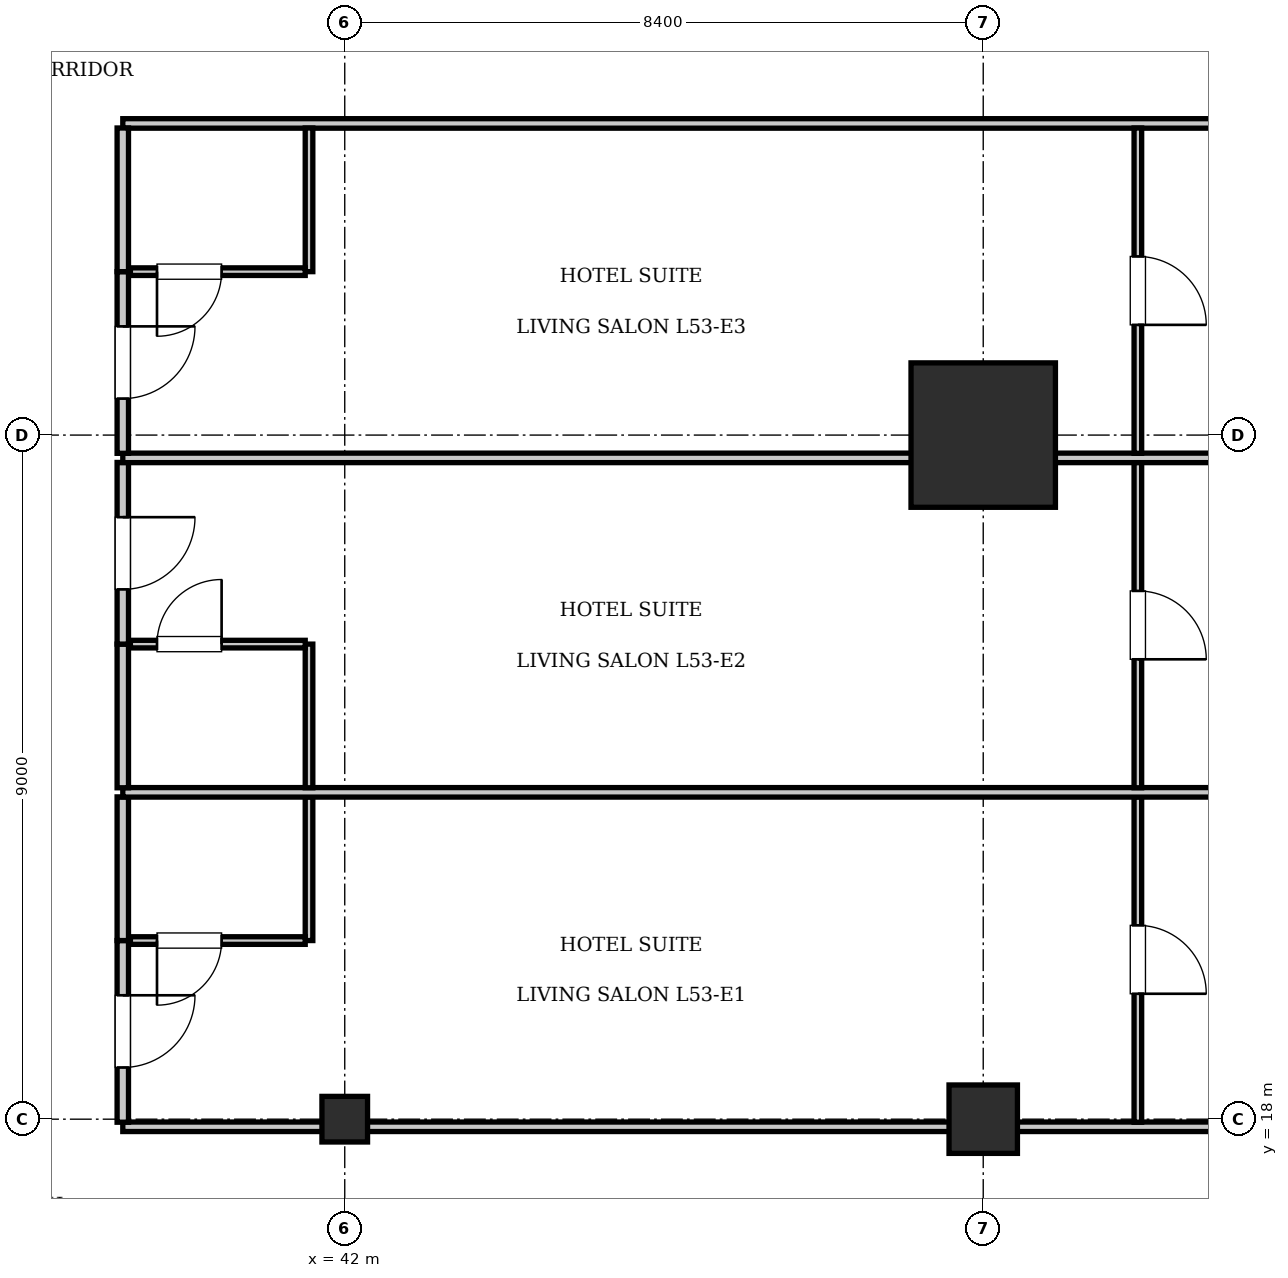
"""IFC4 building model, lengths in metres.
Left out: names, types, materials, properties, quantities, classifications, styles, units other than length and angle.
Written with IfcOpenShell. Run it as: python <this file> out.ifc"""

import sys

from ifc_helpers import new_model, si_unit, direction, frame, frame_2d, origin, origin_2d, place, context, subcontext, project, spatial, rectangle, i_section, extrude, element, fill, save


model = new_model("IFC4")
c1 = context("Model", 3, precision=1e-05, world=origin(), true_north=direction((0.0, 1.0)))
c2 = subcontext(c1, "Body", "Model", "MODEL_VIEW")
j1 = project(units=[si_unit("LENGTHUNIT", "METRE"), si_unit("PLANEANGLEUNIT", "RADIAN")], contexts=[c1])
p1 = place(None, origin())
s1 = spatial("IfcSite", under=j1, at=p1, CompositionType="ELEMENT")
p2 = place(p1, origin())
s2 = spatial("IfcBuilding", under=s1, at=p2, CompositionType="ELEMENT")
p3 = place(p2, frame((0.0, 0.0, 215.95)))
s3 = spatial("IfcBuildingStorey", under=s2, at=p3, CompositionType="ELEMENT", Elevation=215.95)
p4 = place(p3, frame((50.4, 27.0, 0.0), z_axis=(0.0, 0.0, 1.0), x_axis=(1.0, 0.0, 0.0)))
e1 = element("IfcColumn", 1, at=p4, inside=s3, PredefinedType="COLUMN", context=c2, shape_type="SweptSolid", body=[
    extrude(rectangle(XDim=1.9, YDim=1.9, at=origin_2d()), origin(), (0.0, 0.0, 1.0), 3.85),
])
p5 = place(p3, frame((50.4, 18.0, 0.0), z_axis=(0.0, 0.0, 1.0), x_axis=(1.0, 0.0, 0.0)))
e2 = element("IfcColumn", 2, at=p5, inside=s3, PredefinedType="COLUMN", context=c2, shape_type="SweptSolid", body=[
    extrude(rectangle(XDim=0.9, YDim=0.9, at=origin_2d()), origin(), (0.0, 0.0, 1.0), 3.85),
])
p6 = place(p3, frame((42.0, 18.0, 0.0), z_axis=(0.0, 0.0, 1.0), x_axis=(1.0, 0.0, 0.0)))
e3 = element("IfcColumn", 3, at=p6, inside=s3, PredefinedType="COLUMN", context=c2, shape_type="SweptSolid", body=[
    extrude(i_section(OverallWidth=0.6, OverallDepth=0.6, WebThickness=0.025, FlangeThickness=0.038, at=origin_2d()), origin(), (0.0, 0.0, 1.0), 3.85),
])
p7 = place(p3, frame((39.08, 17.9, 0.0), z_axis=(0.0, 0.0, 1.0), x_axis=(1.0, 0.0, 0.0)))
e4 = element("IfcWall", 4, at=p7, inside=s3, PredefinedType="PARTITIONING", context=c2, shape_type="SweptSolid", body=[
    extrude(rectangle(XDim=23.32, YDim=0.125, at=frame_2d((11.66, 0.0))), origin(), (0.0, 0.0, 1.0), 3.071),
])
p8 = place(p3, frame((39.08, 31.1, 0.0), z_axis=(0.0, 0.0, 1.0), x_axis=(1.0, 0.0, 0.0)))
e5 = element("IfcWall", 5, at=p8, inside=s3, PredefinedType="PARTITIONING", context=c2, shape_type="SweptSolid", body=[
    extrude(rectangle(XDim=23.32, YDim=0.125, at=frame_2d((11.66, 0.0))), origin(), (0.0, 0.0, 1.0), 3.61),
])
p9 = place(p3, frame((39.08, 17.96, 0.0), z_axis=(0.0, 0.0, 1.0), x_axis=(0.0, 1.0, 0.0)))
e6 = element("IfcWall", 6, at=p9, inside=s3, PredefinedType="PARTITIONING", context=c2, shape_type="SweptSolid", body=[
    extrude(rectangle(XDim=2.39, YDim=0.15, at=frame_2d((1.195, 0.0))), origin(), (0.0, 0.0, 1.0), 3.61),
])
p10 = place(p9, frame((0.72, 0.0, 0.0)))
e7 = element("IfcOpeningElement", 7, at=p10, cuts=e6, PredefinedType="OPENING", context=c2, shape_type="SweptSolid", body=[
    extrude(rectangle(XDim=0.95, YDim=2.15, at=frame_2d((0.475, 1.075))), frame((0.0, 0.085, 0.0), z_axis=(0.0, -1.0, 0.0), x_axis=(1.0, 0.0, 0.0)), (0.0, 0.0, 1.0), 0.17),
])
p11 = place(p3, frame((39.08, 20.35, 0.0), z_axis=(0.0, 0.0, 1.0), x_axis=(0.0, 1.0, 0.0)))
e8 = element("IfcWall", 8, at=p11, inside=s3, PredefinedType="PARTITIONING", context=c2, shape_type="SweptSolid", body=[
    extrude(rectangle(XDim=1.89, YDim=0.15, at=frame_2d((0.945, 0.0))), origin(), (0.0, 0.0, 1.0), 3.61),
])
p12 = place(p3, frame((41.53, 20.35, 0.0), z_axis=(0.0, 0.0, 1.0), x_axis=(0.0, 1.0, 0.0)))
e9 = element("IfcWall", 9, at=p12, inside=s3, PredefinedType="PARTITIONING", context=c2, shape_type="SweptSolid", body=[
    extrude(rectangle(XDim=1.89, YDim=0.1, at=frame_2d((0.945, 0.0))), origin(), (0.0, 0.0, 1.0), 3.61),
])
p13 = place(p3, frame((39.18, 20.35, 0.0), z_axis=(0.0, 0.0, 1.0), x_axis=(1.0, 0.0, 0.0)))
e10 = element("IfcWall", 10, at=p13, inside=s3, PredefinedType="PARTITIONING", context=c2, shape_type="SweptSolid", body=[
    extrude(rectangle(XDim=2.3, YDim=0.1, at=frame_2d((1.15, 0.0))), origin(), (0.0, 0.0, 1.0), 3.61),
])
p14 = place(p13, frame((0.35, 0.0, 0.0)))
e11 = element("IfcOpeningElement", 11, at=p14, cuts=e10, PredefinedType="OPENING", context=c2, shape_type="SweptSolid", body=[
    extrude(rectangle(XDim=0.85, YDim=2.1, at=frame_2d((0.425, 1.05))), frame((0.0, 0.06, 0.0), z_axis=(0.0, -1.0, 0.0), x_axis=(1.0, 0.0, 0.0)), (0.0, 0.0, 1.0), 0.12),
])
p15 = place(p3, frame((52.434, 17.96, 0.0), z_axis=(0.0, 0.0, 1.0), x_axis=(0.0, 1.0, 0.0)))
e12 = element("IfcWall", 12, at=p15, inside=s3, PredefinedType="PARTITIONING", context=c2, shape_type="SweptSolid", body=[
    extrude(rectangle(XDim=4.28, YDim=0.1, at=frame_2d((2.14, 0.0))), origin(), (0.0, 0.0, 1.0), 3.61),
])
p16 = place(p15, frame((1.69, 0.0, 0.0)))
e13 = element("IfcOpeningElement", 13, at=p16, cuts=e12, PredefinedType="OPENING", context=c2, shape_type="SweptSolid", body=[
    extrude(rectangle(XDim=0.9, YDim=2.1, at=frame_2d((0.45, 1.05))), frame((0.0, 0.06, 0.0), z_axis=(0.0, -1.0, 0.0), x_axis=(1.0, 0.0, 0.0)), (0.0, 0.0, 1.0), 0.12),
])
p17 = place(p3, frame((39.08, 22.3, 0.0), z_axis=(0.0, 0.0, 1.0), x_axis=(1.0, 0.0, 0.0)))
e14 = element("IfcWall", 14, at=p17, inside=s3, PredefinedType="PARTITIONING", context=c2, shape_type="SweptSolid", body=[
    extrude(rectangle(XDim=23.32, YDim=0.125, at=frame_2d((11.66, 0.0))), origin(), (0.0, 0.0, 1.0), 3.61),
])
p18 = place(p3, frame((39.08, 22.36, 0.0), z_axis=(0.0, 0.0, 1.0), x_axis=(0.0, 1.0, 0.0)))
e15 = element("IfcWall", 15, at=p18, inside=s3, PredefinedType="PARTITIONING", context=c2, shape_type="SweptSolid", body=[
    extrude(rectangle(XDim=1.89, YDim=0.15, at=frame_2d((0.945, 0.0))), origin(), (0.0, 0.0, 1.0), 3.61),
])
p19 = place(p3, frame((39.08, 24.25, 0.0), z_axis=(0.0, 0.0, 1.0), x_axis=(0.0, 1.0, 0.0)))
e16 = element("IfcWall", 16, at=p19, inside=s3, PredefinedType="PARTITIONING", context=c2, shape_type="SweptSolid", body=[
    extrude(rectangle(XDim=2.39, YDim=0.15, at=frame_2d((1.195, 0.0))), origin(), (0.0, 0.0, 1.0), 3.61),
])
p20 = place(p19, frame((0.72, 0.0, 0.0)))
e17 = element("IfcOpeningElement", 17, at=p20, cuts=e16, PredefinedType="OPENING", context=c2, shape_type="SweptSolid", body=[
    extrude(rectangle(XDim=0.95, YDim=2.15, at=frame_2d((0.475, 1.075))), frame((0.0, 0.085, 0.0), z_axis=(0.0, -1.0, 0.0), x_axis=(1.0, 0.0, 0.0)), (0.0, 0.0, 1.0), 0.17),
])
p21 = place(p3, frame((41.53, 22.36, 0.0), z_axis=(0.0, 0.0, 1.0), x_axis=(0.0, 1.0, 0.0)))
e18 = element("IfcWall", 18, at=p21, inside=s3, PredefinedType="PARTITIONING", context=c2, shape_type="SweptSolid", body=[
    extrude(rectangle(XDim=1.89, YDim=0.1, at=frame_2d((0.945, 0.0))), origin(), (0.0, 0.0, 1.0), 3.61),
])
p22 = place(p3, frame((39.18, 24.25, 0.0), z_axis=(0.0, 0.0, 1.0), x_axis=(1.0, 0.0, 0.0)))
e19 = element("IfcWall", 19, at=p22, inside=s3, PredefinedType="PARTITIONING", context=c2, shape_type="SweptSolid", body=[
    extrude(rectangle(XDim=2.3, YDim=0.1, at=frame_2d((1.15, 0.0))), origin(), (0.0, 0.0, 1.0), 3.61),
])
p23 = place(p22, frame((0.35, 0.0, 0.0)))
e20 = element("IfcOpeningElement", 20, at=p23, cuts=e19, PredefinedType="OPENING", context=c2, shape_type="SweptSolid", body=[
    extrude(rectangle(XDim=0.85, YDim=2.1, at=frame_2d((0.425, 1.05))), frame((0.0, 0.06, 0.0), z_axis=(0.0, -1.0, 0.0), x_axis=(1.0, 0.0, 0.0)), (0.0, 0.0, 1.0), 0.12),
])
p24 = place(p3, frame((52.434, 22.36, 0.0), z_axis=(0.0, 0.0, 1.0), x_axis=(0.0, 1.0, 0.0)))
e21 = element("IfcWall", 21, at=p24, inside=s3, PredefinedType="PARTITIONING", context=c2, shape_type="SweptSolid", body=[
    extrude(rectangle(XDim=4.28, YDim=0.1, at=frame_2d((2.14, 0.0))), origin(), (0.0, 0.0, 1.0), 3.61),
])
p25 = place(p24, frame((1.69, 0.0, 0.0)))
e22 = element("IfcOpeningElement", 22, at=p25, cuts=e21, PredefinedType="OPENING", context=c2, shape_type="SweptSolid", body=[
    extrude(rectangle(XDim=0.9, YDim=2.1, at=frame_2d((0.45, 1.05))), frame((0.0, 0.06, 0.0), z_axis=(0.0, -1.0, 0.0), x_axis=(1.0, 0.0, 0.0)), (0.0, 0.0, 1.0), 0.12),
])
p26 = place(p3, frame((39.08, 26.7, 0.0), z_axis=(0.0, 0.0, 1.0), x_axis=(1.0, 0.0, 0.0)))
e23 = element("IfcWall", 23, at=p26, inside=s3, PredefinedType="PARTITIONING", context=c2, shape_type="SweptSolid", body=[
    extrude(rectangle(XDim=23.32, YDim=0.125, at=frame_2d((11.66, 0.0))), origin(), (0.0, 0.0, 1.0), 3.61),
])
p27 = place(p3, frame((39.08, 26.76, 0.0), z_axis=(0.0, 0.0, 1.0), x_axis=(0.0, 1.0, 0.0)))
e24 = element("IfcWall", 24, at=p27, inside=s3, PredefinedType="PARTITIONING", context=c2, shape_type="SweptSolid", body=[
    extrude(rectangle(XDim=2.39, YDim=0.15, at=frame_2d((1.195, 0.0))), origin(), (0.0, 0.0, 1.0), 3.61),
])
p28 = place(p27, frame((0.72, 0.0, 0.0)))
e25 = element("IfcOpeningElement", 25, at=p28, cuts=e24, PredefinedType="OPENING", context=c2, shape_type="SweptSolid", body=[
    extrude(rectangle(XDim=0.95, YDim=2.15, at=frame_2d((0.475, 1.075))), frame((0.0, 0.085, 0.0), z_axis=(0.0, -1.0, 0.0), x_axis=(1.0, 0.0, 0.0)), (0.0, 0.0, 1.0), 0.17),
])
p29 = place(p3, frame((39.08, 29.15, 0.0), z_axis=(0.0, 0.0, 1.0), x_axis=(0.0, 1.0, 0.0)))
e26 = element("IfcWall", 26, at=p29, inside=s3, PredefinedType="PARTITIONING", context=c2, shape_type="SweptSolid", body=[
    extrude(rectangle(XDim=1.89, YDim=0.15, at=frame_2d((0.945, 0.0))), origin(), (0.0, 0.0, 1.0), 3.61),
])
p30 = place(p3, frame((41.53, 29.15, 0.0), z_axis=(0.0, 0.0, 1.0), x_axis=(0.0, 1.0, 0.0)))
e27 = element("IfcWall", 27, at=p30, inside=s3, PredefinedType="PARTITIONING", context=c2, shape_type="SweptSolid", body=[
    extrude(rectangle(XDim=1.89, YDim=0.1, at=frame_2d((0.945, 0.0))), origin(), (0.0, 0.0, 1.0), 3.61),
])
p31 = place(p3, frame((39.18, 29.15, 0.0), z_axis=(0.0, 0.0, 1.0), x_axis=(1.0, 0.0, 0.0)))
e28 = element("IfcWall", 28, at=p31, inside=s3, PredefinedType="PARTITIONING", context=c2, shape_type="SweptSolid", body=[
    extrude(rectangle(XDim=2.3, YDim=0.1, at=frame_2d((1.15, 0.0))), origin(), (0.0, 0.0, 1.0), 3.61),
])
p32 = place(p31, frame((0.35, 0.0, 0.0)))
e29 = element("IfcOpeningElement", 29, at=p32, cuts=e28, PredefinedType="OPENING", context=c2, shape_type="SweptSolid", body=[
    extrude(rectangle(XDim=0.85, YDim=2.1, at=frame_2d((0.425, 1.05))), frame((0.0, 0.06, 0.0), z_axis=(0.0, -1.0, 0.0), x_axis=(1.0, 0.0, 0.0)), (0.0, 0.0, 1.0), 0.12),
])
p33 = place(p3, frame((52.434, 26.76, 0.0), z_axis=(0.0, 0.0, 1.0), x_axis=(0.0, 1.0, 0.0)))
e30 = element("IfcWall", 30, at=p33, inside=s3, PredefinedType="PARTITIONING", context=c2, shape_type="SweptSolid", body=[
    extrude(rectangle(XDim=4.28, YDim=0.1, at=frame_2d((2.14, 0.0))), origin(), (0.0, 0.0, 1.0), 3.61),
])
p34 = place(p33, frame((1.69, 0.0, 0.0)))
e31 = element("IfcOpeningElement", 31, at=p34, cuts=e30, PredefinedType="OPENING", context=c2, shape_type="SweptSolid", body=[
    extrude(rectangle(XDim=0.9, YDim=2.1, at=frame_2d((0.45, 1.05))), frame((0.0, 0.06, 0.0), z_axis=(0.0, -1.0, 0.0), x_axis=(1.0, 0.0, 0.0)), (0.0, 0.0, 1.0), 0.12),
])
p35 = place(p14, frame((0.85, 0.0, 0.0), z_axis=(0.0, 0.0, 1.0), x_axis=(-1.0, 0.0, 0.0)))
e32 = element("IfcDoor", 32, at=p35, inside=s3, OperationType="SINGLE_SWING_RIGHT", PredefinedType="DOOR", context=c2, shape_type="SweptSolid", body=[
    extrude(rectangle(XDim=0.85, YDim=2.1, at=frame_2d((0.425, 1.05))), frame((0.0, 0.025, 0.0), z_axis=(0.0, -1.0, 0.0), x_axis=(1.0, 0.0, 0.0)), (0.0, 0.0, 1.0), 0.05),
])
fill(e11, e32)
p36 = place(p10, frame((0.95, 0.0, 0.0), z_axis=(0.0, 0.0, 1.0), x_axis=(-1.0, 0.0, 0.0)))
e33 = element("IfcDoor", 33, at=p36, inside=s3, OperationType="SINGLE_SWING_LEFT", PredefinedType="DOOR", context=c2, shape_type="SweptSolid", body=[
    extrude(rectangle(XDim=0.95, YDim=2.15, at=frame_2d((0.475, 1.075))), frame((0.0, 0.025, 0.0), z_axis=(0.0, -1.0, 0.0), x_axis=(1.0, 0.0, 0.0)), (0.0, 0.0, 1.0), 0.05),
])
fill(e7, e33)
p37 = place(p16, frame((0.9, 0.0, 0.0), z_axis=(0.0, 0.0, 1.0), x_axis=(-1.0, 0.0, 0.0)))
e34 = element("IfcDoor", 34, at=p37, inside=s3, OperationType="SINGLE_SWING_RIGHT", PredefinedType="DOOR", context=c2, shape_type="SweptSolid", body=[
    extrude(rectangle(XDim=0.9, YDim=2.1, at=frame_2d((0.45, 1.05))), frame((0.0, 0.025, 0.0), z_axis=(0.0, -1.0, 0.0), x_axis=(1.0, 0.0, 0.0)), (0.0, 0.0, 1.0), 0.05),
])
fill(e13, e34)
p38 = place(p23, origin())
e35 = element("IfcDoor", 35, at=p38, inside=s3, OperationType="SINGLE_SWING_RIGHT", PredefinedType="DOOR", context=c2, shape_type="SweptSolid", body=[
    extrude(rectangle(XDim=0.85, YDim=2.1, at=frame_2d((0.425, 1.05))), frame((0.0, 0.025, 0.0), z_axis=(0.0, -1.0, 0.0), x_axis=(1.0, 0.0, 0.0)), (0.0, 0.0, 1.0), 0.05),
])
fill(e20, e35)
p39 = place(p20, frame((0.95, 0.0, 0.0), z_axis=(0.0, 0.0, 1.0), x_axis=(-1.0, 0.0, 0.0)))
e36 = element("IfcDoor", 36, at=p39, inside=s3, OperationType="SINGLE_SWING_LEFT", PredefinedType="DOOR", context=c2, shape_type="SweptSolid", body=[
    extrude(rectangle(XDim=0.95, YDim=2.15, at=frame_2d((0.475, 1.075))), frame((0.0, 0.025, 0.0), z_axis=(0.0, -1.0, 0.0), x_axis=(1.0, 0.0, 0.0)), (0.0, 0.0, 1.0), 0.05),
])
fill(e17, e36)
p40 = place(p25, frame((0.9, 0.0, 0.0), z_axis=(0.0, 0.0, 1.0), x_axis=(-1.0, 0.0, 0.0)))
e37 = element("IfcDoor", 37, at=p40, inside=s3, OperationType="SINGLE_SWING_RIGHT", PredefinedType="DOOR", context=c2, shape_type="SweptSolid", body=[
    extrude(rectangle(XDim=0.9, YDim=2.1, at=frame_2d((0.45, 1.05))), frame((0.0, 0.025, 0.0), z_axis=(0.0, -1.0, 0.0), x_axis=(1.0, 0.0, 0.0)), (0.0, 0.0, 1.0), 0.05),
])
fill(e22, e37)
p41 = place(p32, frame((0.85, 0.0, 0.0), z_axis=(0.0, 0.0, 1.0), x_axis=(-1.0, 0.0, 0.0)))
e38 = element("IfcDoor", 38, at=p41, inside=s3, OperationType="SINGLE_SWING_RIGHT", PredefinedType="DOOR", context=c2, shape_type="SweptSolid", body=[
    extrude(rectangle(XDim=0.85, YDim=2.1, at=frame_2d((0.425, 1.05))), frame((0.0, 0.025, 0.0), z_axis=(0.0, -1.0, 0.0), x_axis=(1.0, 0.0, 0.0)), (0.0, 0.0, 1.0), 0.05),
])
fill(e29, e38)
p42 = place(p28, frame((0.95, 0.0, 0.0), z_axis=(0.0, 0.0, 1.0), x_axis=(-1.0, 0.0, 0.0)))
e39 = element("IfcDoor", 39, at=p42, inside=s3, OperationType="SINGLE_SWING_LEFT", PredefinedType="DOOR", context=c2, shape_type="SweptSolid", body=[
    extrude(rectangle(XDim=0.95, YDim=2.15, at=frame_2d((0.475, 1.075))), frame((0.0, 0.025, 0.0), z_axis=(0.0, -1.0, 0.0), x_axis=(1.0, 0.0, 0.0)), (0.0, 0.0, 1.0), 0.05),
])
fill(e25, e39)
p43 = place(p34, frame((0.9, 0.0, 0.0), z_axis=(0.0, 0.0, 1.0), x_axis=(-1.0, 0.0, 0.0)))
e40 = element("IfcDoor", 40, at=p43, inside=s3, OperationType="SINGLE_SWING_RIGHT", PredefinedType="DOOR", context=c2, shape_type="SweptSolid", body=[
    extrude(rectangle(XDim=0.9, YDim=2.1, at=frame_2d((0.45, 1.05))), frame((0.0, 0.025, 0.0), z_axis=(0.0, -1.0, 0.0), x_axis=(1.0, 0.0, 0.0)), (0.0, 0.0, 1.0), 0.05),
])
fill(e31, e40)
save(model, sys.argv[1])
